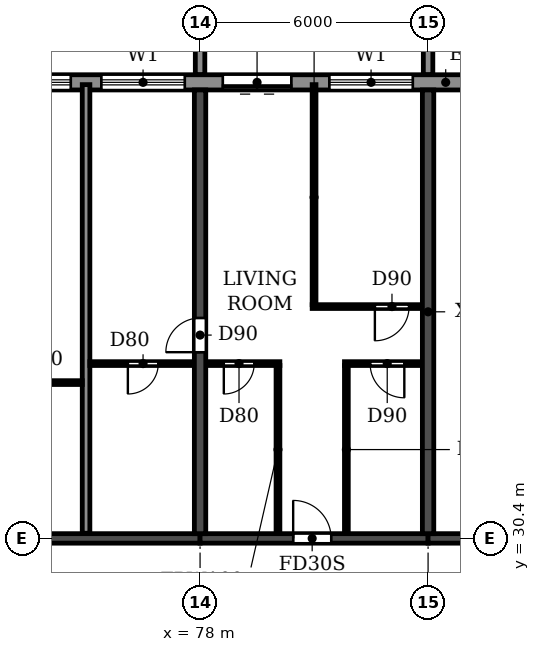
"""IFC4 building model, lengths in metres.
Left out: names, types, materials, properties, quantities, classifications, styles, units other than length and angle.
Written with IfcOpenShell. Run it as: python <this file> out.ifc"""

import sys

from ifc_helpers import new_model, si_unit, direction, frame, frame_2d, origin, place, context, subcontext, project, spatial, polyline, rectangle, outline, extrude, source, transform, mapped, element, fill, save


model = new_model("IFC4")
c1 = context("Model", 3, precision=1e-05, world=origin(), true_north=direction((0.0, 1.0)))
c2 = subcontext(c1, "Body", "Model", "MODEL_VIEW")
j1 = project(units=[si_unit("LENGTHUNIT", "METRE"), si_unit("PLANEANGLEUNIT", "RADIAN")], contexts=[c1])
p1 = place(None, origin())
s1 = spatial("IfcSite", under=j1, at=p1, CompositionType="ELEMENT")
p2 = place(p1, origin())
s2 = spatial("IfcBuilding", under=s1, at=p2, CompositionType="ELEMENT")
p3 = place(p2, frame((0.0, 0.0, 125.7)))
s3 = spatial("IfcBuildingStorey", under=s2, at=p3, CompositionType="ELEMENT", Elevation=125.7)
p4 = place(p3, frame((78.0, 30.525, 0.0), z_axis=(0.0, 0.0, 1.0), x_axis=(0.0, 1.0, 0.0)))
e1 = element("IfcWall", 1, at=p4, inside=s3, PredefinedType="SHEAR", context=c2, shape_type="SweptSolid", body=[
    extrude(rectangle(XDim=11.675, YDim=0.3, at=frame_2d((5.837, 0.0))), origin(), (0.0, 0.0, 1.0), 3.07),
])
p5 = place(p4, frame((4.775, 0.0, 0.0)))
e2 = element("IfcOpeningElement", 2, at=p5, cuts=e1, PredefinedType="OPENING", context=c2, shape_type="SweptSolid", body=[
    extrude(rectangle(XDim=0.9, YDim=2.1, at=frame_2d((0.45, 1.05))), frame((0.0, 0.16, 0.0), z_axis=(0.0, -1.0, 0.0), x_axis=(1.0, 0.0, 0.0)), (0.0, 0.0, 1.0), 0.32),
])
p6 = place(p3, frame((84.0, 30.525, 0.0), z_axis=(0.0, 0.0, 1.0), x_axis=(0.0, 1.0, 0.0)))
e3 = element("IfcWall", 3, at=p6, inside=s3, PredefinedType="SHEAR", context=c2, shape_type="SweptSolid", body=[
    extrude(rectangle(XDim=11.675, YDim=0.3, at=frame_2d((5.837, 0.0))), origin(), (0.0, 0.0, 1.0), 3.07),
])
p7 = place(p3, frame((72.0, 30.4, 0.0), z_axis=(0.0, 0.0, 1.0), x_axis=(1.0, 0.0, 0.0)))
e4 = element("IfcWall", 4, at=p7, inside=s3, PredefinedType="SHEAR", context=c2, shape_type="SweptSolid", body=[
    extrude(rectangle(XDim=6.0, YDim=0.25, at=frame_2d((3.0, 0.0))), origin(), (0.0, 0.0, 1.0), 2.47),
])
p8 = place(p3, frame((78.0, 30.4, 0.0), z_axis=(0.0, 0.0, 1.0), x_axis=(1.0, 0.0, 0.0)))
e5 = element("IfcWall", 5, at=p8, inside=s3, PredefinedType="SHEAR", context=c2, shape_type="SweptSolid", body=[
    extrude(rectangle(XDim=6.0, YDim=0.25, at=frame_2d((3.0, 0.0))), origin(), (0.0, 0.0, 1.0), 2.47),
])
p9 = place(p8, frame((2.45, 0.0, 0.0)))
e6 = element("IfcOpeningElement", 6, at=p9, cuts=e5, PredefinedType="OPENING", context=c2, shape_type="SweptSolid", body=[
    extrude(rectangle(XDim=1.0, YDim=2.1, at=frame_2d((0.5, 1.05))), frame((0.0, 0.135, 0.0), z_axis=(0.0, -1.0, 0.0), x_axis=(1.0, 0.0, 0.0)), (0.0, 0.0, 1.0), 0.27),
])
p10 = place(p3, frame((84.0, 30.4, 0.0), z_axis=(0.0, 0.0, 1.0), x_axis=(1.0, 0.0, 0.0)))
e7 = element("IfcWall", 7, at=p10, inside=s3, PredefinedType="SHEAR", context=c2, shape_type="SweptSolid", body=[
    extrude(rectangle(XDim=5.8, YDim=0.25, at=frame_2d((2.9, 0.0))), origin(), (0.0, 0.0, 1.0), 2.47),
])
p11 = place(p10, frame((2.5, 0.0, 0.0)))
e8 = element("IfcOpeningElement", 8, at=p11, cuts=e7, PredefinedType="OPENING", context=c2, shape_type="SweptSolid", body=[
    extrude(rectangle(XDim=1.0, YDim=2.1, at=frame_2d((0.5, 1.05))), frame((0.0, 0.135, 0.0), z_axis=(0.0, -1.0, 0.0), x_axis=(1.0, 0.0, 0.0)), (0.0, 0.0, 1.0), 0.27),
])
p12 = place(p3, frame((85.317, 42.4, 0.0), z_axis=(0.0, 0.0, 1.0), x_axis=(-1.0, 0.0, 0.0)))
e9 = element("IfcWall", 9, at=p12, inside=s3, PredefinedType="STANDARD", context=c2, shape_type="SweptSolid", body=[
    extrude(rectangle(XDim=68.634, YDim=0.4, at=frame_2d((34.317, 0.0))), origin(), (0.0, 0.0, 1.0), 3.07),
])
p13 = place(p12, frame((64.717, 0.0, 0.9)))
e10 = element("IfcOpeningElement", 10, at=p13, cuts=e9, PredefinedType="OPENING", context=c2, shape_type="SweptSolid", body=[
    extrude(rectangle(XDim=2.2, YDim=1.5, at=frame_2d((1.1, 0.75))), frame((0.0, 0.21, 0.0), z_axis=(0.0, -1.0, 0.0), x_axis=(1.0, 0.0, 0.0)), (0.0, 0.0, 1.0), 0.42),
])
p14 = place(p12, frame((61.917, 0.0, 0.0)))
e11 = element("IfcOpeningElement", 11, at=p14, cuts=e9, PredefinedType="OPENING", context=c2, shape_type="SweptSolid", body=[
    extrude(rectangle(XDim=1.8, YDim=2.4, at=frame_2d((0.9, 1.2))), frame((0.0, 0.21, 0.0), z_axis=(0.0, -1.0, 0.0), x_axis=(1.0, 0.0, 0.0)), (0.0, 0.0, 1.0), 0.42),
])
p15 = place(p12, frame((58.717, 0.0, 0.9)))
e12 = element("IfcOpeningElement", 12, at=p15, cuts=e9, PredefinedType="OPENING", context=c2, shape_type="SweptSolid", body=[
    extrude(rectangle(XDim=2.2, YDim=1.5, at=frame_2d((1.1, 0.75))), frame((0.0, 0.21, 0.0), z_axis=(0.0, -1.0, 0.0), x_axis=(1.0, 0.0, 0.0)), (0.0, 0.0, 1.0), 0.42),
])
p16 = place(p12, frame((55.917, 0.0, 0.0)))
e13 = element("IfcOpeningElement", 13, at=p16, cuts=e9, PredefinedType="OPENING", context=c2, shape_type="SweptSolid", body=[
    extrude(rectangle(XDim=1.8, YDim=2.4, at=frame_2d((0.9, 1.2))), frame((0.0, 0.21, 0.0), z_axis=(0.0, -1.0, 0.0), x_axis=(1.0, 0.0, 0.0)), (0.0, 0.0, 1.0), 0.42),
])
p17 = place(p12, frame((52.717, 0.0, 0.9)))
e14 = element("IfcOpeningElement", 14, at=p17, cuts=e9, PredefinedType="OPENING", context=c2, shape_type="SweptSolid", body=[
    extrude(rectangle(XDim=2.2, YDim=1.5, at=frame_2d((1.1, 0.75))), frame((0.0, 0.21, 0.0), z_axis=(0.0, -1.0, 0.0), x_axis=(1.0, 0.0, 0.0)), (0.0, 0.0, 1.0), 0.42),
])
p18 = place(p12, frame((49.917, 0.0, 0.0)))
e15 = element("IfcOpeningElement", 15, at=p18, cuts=e9, PredefinedType="OPENING", context=c2, shape_type="SweptSolid", body=[
    extrude(rectangle(XDim=1.8, YDim=2.4, at=frame_2d((0.9, 1.2))), frame((0.0, 0.21, 0.0), z_axis=(0.0, -1.0, 0.0), x_axis=(1.0, 0.0, 0.0)), (0.0, 0.0, 1.0), 0.42),
])
p19 = place(p12, frame((46.717, 0.0, 0.9)))
e16 = element("IfcOpeningElement", 16, at=p19, cuts=e9, PredefinedType="OPENING", context=c2, shape_type="SweptSolid", body=[
    extrude(rectangle(XDim=2.2, YDim=1.5, at=frame_2d((1.1, 0.75))), frame((0.0, 0.21, 0.0), z_axis=(0.0, -1.0, 0.0), x_axis=(1.0, 0.0, 0.0)), (0.0, 0.0, 1.0), 0.42),
])
p20 = place(p12, frame((43.917, 0.0, 0.0)))
e17 = element("IfcOpeningElement", 17, at=p20, cuts=e9, PredefinedType="OPENING", context=c2, shape_type="SweptSolid", body=[
    extrude(rectangle(XDim=1.8, YDim=2.4, at=frame_2d((0.9, 1.2))), frame((0.0, 0.21, 0.0), z_axis=(0.0, -1.0, 0.0), x_axis=(1.0, 0.0, 0.0)), (0.0, 0.0, 1.0), 0.42),
])
p21 = place(p12, frame((40.717, 0.0, 0.9)))
e18 = element("IfcOpeningElement", 18, at=p21, cuts=e9, PredefinedType="OPENING", context=c2, shape_type="SweptSolid", body=[
    extrude(rectangle(XDim=2.2, YDim=1.5, at=frame_2d((1.1, 0.75))), frame((0.0, 0.21, 0.0), z_axis=(0.0, -1.0, 0.0), x_axis=(1.0, 0.0, 0.0)), (0.0, 0.0, 1.0), 0.42),
])
p22 = place(p12, frame((37.717, 0.0, 0.9)))
e19 = element("IfcOpeningElement", 19, at=p22, cuts=e9, PredefinedType="OPENING", context=c2, shape_type="SweptSolid", body=[
    extrude(rectangle(XDim=2.2, YDim=1.5, at=frame_2d((1.1, 0.75))), frame((0.0, 0.21, 0.0), z_axis=(0.0, -1.0, 0.0), x_axis=(1.0, 0.0, 0.0)), (0.0, 0.0, 1.0), 0.42),
])
p23 = place(p12, frame((34.917, 0.0, 0.0)))
e20 = element("IfcOpeningElement", 20, at=p23, cuts=e9, PredefinedType="OPENING", context=c2, shape_type="SweptSolid", body=[
    extrude(rectangle(XDim=1.8, YDim=2.4, at=frame_2d((0.9, 1.2))), frame((0.0, 0.21, 0.0), z_axis=(0.0, -1.0, 0.0), x_axis=(1.0, 0.0, 0.0)), (0.0, 0.0, 1.0), 0.42),
])
p24 = place(p12, frame((31.717, 0.0, 0.9)))
e21 = element("IfcOpeningElement", 21, at=p24, cuts=e9, PredefinedType="OPENING", context=c2, shape_type="SweptSolid", body=[
    extrude(rectangle(XDim=2.2, YDim=1.5, at=frame_2d((1.1, 0.75))), frame((0.0, 0.21, 0.0), z_axis=(0.0, -1.0, 0.0), x_axis=(1.0, 0.0, 0.0)), (0.0, 0.0, 1.0), 0.42),
])
p25 = place(p12, frame((28.717, 0.0, 0.9)))
e22 = element("IfcOpeningElement", 22, at=p25, cuts=e9, PredefinedType="OPENING", context=c2, shape_type="SweptSolid", body=[
    extrude(rectangle(XDim=2.2, YDim=1.5, at=frame_2d((1.1, 0.75))), frame((0.0, 0.21, 0.0), z_axis=(0.0, -1.0, 0.0), x_axis=(1.0, 0.0, 0.0)), (0.0, 0.0, 1.0), 0.42),
])
p26 = place(p12, frame((25.717, 0.0, 0.9)))
e23 = element("IfcOpeningElement", 23, at=p26, cuts=e9, PredefinedType="OPENING", context=c2, shape_type="SweptSolid", body=[
    extrude(rectangle(XDim=2.2, YDim=1.5, at=frame_2d((1.1, 0.75))), frame((0.0, 0.21, 0.0), z_axis=(0.0, -1.0, 0.0), x_axis=(1.0, 0.0, 0.0)), (0.0, 0.0, 1.0), 0.42),
])
p27 = place(p12, frame((22.717, 0.0, 0.9)))
e24 = element("IfcOpeningElement", 24, at=p27, cuts=e9, PredefinedType="OPENING", context=c2, shape_type="SweptSolid", body=[
    extrude(rectangle(XDim=2.2, YDim=1.5, at=frame_2d((1.1, 0.75))), frame((0.0, 0.21, 0.0), z_axis=(0.0, -1.0, 0.0), x_axis=(1.0, 0.0, 0.0)), (0.0, 0.0, 1.0), 0.42),
])
p28 = place(p12, frame((19.917, 0.0, 0.0)))
e25 = element("IfcOpeningElement", 25, at=p28, cuts=e9, PredefinedType="OPENING", context=c2, shape_type="SweptSolid", body=[
    extrude(rectangle(XDim=1.8, YDim=2.4, at=frame_2d((0.9, 1.2))), frame((0.0, 0.21, 0.0), z_axis=(0.0, -1.0, 0.0), x_axis=(1.0, 0.0, 0.0)), (0.0, 0.0, 1.0), 0.42),
])
p29 = place(p12, frame((16.917, 0.0, 0.0)))
e26 = element("IfcOpeningElement", 26, at=p29, cuts=e9, PredefinedType="OPENING", context=c2, shape_type="SweptSolid", body=[
    extrude(rectangle(XDim=1.8, YDim=2.4, at=frame_2d((0.9, 1.2))), frame((0.0, 0.21, 0.0), z_axis=(0.0, -1.0, 0.0), x_axis=(1.0, 0.0, 0.0)), (0.0, 0.0, 1.0), 0.42),
])
p30 = place(p12, frame((13.717, 0.0, 0.9)))
e27 = element("IfcOpeningElement", 27, at=p30, cuts=e9, PredefinedType="OPENING", context=c2, shape_type="SweptSolid", body=[
    extrude(rectangle(XDim=2.2, YDim=1.5, at=frame_2d((1.1, 0.75))), frame((0.0, 0.21, 0.0), z_axis=(0.0, -1.0, 0.0), x_axis=(1.0, 0.0, 0.0)), (0.0, 0.0, 1.0), 0.42),
])
p31 = place(p12, frame((10.717, 0.0, 0.9)))
e28 = element("IfcOpeningElement", 28, at=p31, cuts=e9, PredefinedType="OPENING", context=c2, shape_type="SweptSolid", body=[
    extrude(rectangle(XDim=2.2, YDim=1.5, at=frame_2d((1.1, 0.75))), frame((0.0, 0.21, 0.0), z_axis=(0.0, -1.0, 0.0), x_axis=(1.0, 0.0, 0.0)), (0.0, 0.0, 1.0), 0.42),
])
p32 = place(p12, frame((7.717, 0.0, 0.9)))
e29 = element("IfcOpeningElement", 29, at=p32, cuts=e9, PredefinedType="OPENING", context=c2, shape_type="SweptSolid", body=[
    extrude(rectangle(XDim=2.2, YDim=1.5, at=frame_2d((1.1, 0.75))), frame((0.0, 0.21, 0.0), z_axis=(0.0, -1.0, 0.0), x_axis=(1.0, 0.0, 0.0)), (0.0, 0.0, 1.0), 0.42),
])
p33 = place(p12, frame((4.917, 0.0, 0.0)))
e30 = element("IfcOpeningElement", 30, at=p33, cuts=e9, PredefinedType="OPENING", context=c2, shape_type="SweptSolid", body=[
    extrude(rectangle(XDim=1.8, YDim=2.4, at=frame_2d((0.9, 1.2))), frame((0.0, 0.21, 0.0), z_axis=(0.0, -1.0, 0.0), x_axis=(1.0, 0.0, 0.0)), (0.0, 0.0, 1.0), 0.42),
])
p34 = place(p12, frame((1.717, 0.0, 0.9)))
e31 = element("IfcOpeningElement", 31, at=p34, cuts=e9, PredefinedType="OPENING", context=c2, shape_type="SweptSolid", body=[
    extrude(rectangle(XDim=2.2, YDim=1.5, at=frame_2d((1.1, 0.75))), frame((0.0, 0.21, 0.0), z_axis=(0.0, -1.0, 0.0), x_axis=(1.0, 0.0, 0.0)), (0.0, 0.0, 1.0), 0.42),
])
m1 = source(origin(), c2, "Body", "SweptSolid", [
    extrude(outline(polyline([(0.0, 0.0), (0.25, 0.0), (0.25, 3.1), (0.0, 3.1), (0.0, 0.0)])), origin(), (0.0, 0.0, 1.0), 3.1),
])
for number, where in (
    (32, (77.875, 42.6, 0.0)),
    (33, (83.875, 42.6, 0.0)),
):
    element("IfcWall", number, at=place(p3, frame(where)), inside=s3, PredefinedType="STANDARD", context=c2, shape_type="MappedRepresentation", body=[
        mapped(m1, transform((0.0, 0.0, 0.0))),
    ])
p35 = place(p3, frame((75.0, 30.535, 0.0), z_axis=(0.0, 0.0, 1.0), x_axis=(0.0, 1.0, 0.0)))
e34 = element("IfcWall", 34, at=p35, inside=s3, PredefinedType="PARTITIONING", context=c2, shape_type="SweptSolid", body=[
    extrude(rectangle(XDim=11.805, YDim=0.2, at=frame_2d((5.903, 0.0))), origin(), (0.0, 0.0, 1.0), 3.07),
])
p36 = place(p3, frame((72.16, 34.5, 0.0), z_axis=(0.0, 0.0, 1.0), x_axis=(1.0, 0.0, 0.0)))
e35 = element("IfcWall", 35, at=p36, inside=s3, PredefinedType="PARTITIONING", context=c2, shape_type="SweptSolid", body=[
    extrude(rectangle(XDim=2.74, YDim=0.1, at=frame_2d((1.37, 0.0))), origin(), (0.0, 0.0, 1.0), 3.07),
])
p37 = place(p36, frame((0.94, 0.0, 0.0)))
e36 = element("IfcOpeningElement", 36, at=p37, cuts=e35, PredefinedType="OPENING", context=c2, shape_type="SweptSolid", body=[
    extrude(rectangle(XDim=0.8, YDim=2.1, at=frame_2d((0.4, 1.05))), frame((0.0, 0.06, 0.0), z_axis=(0.0, -1.0, 0.0), x_axis=(1.0, 0.0, 0.0)), (0.0, 0.0, 1.0), 0.12),
])
p38 = place(p3, frame((75.1, 35.0, 0.0), z_axis=(0.0, 0.0, 1.0), x_axis=(1.0, 0.0, 0.0)))
e37 = element("IfcWall", 37, at=p38, inside=s3, PredefinedType="PARTITIONING", context=c2, shape_type="SweptSolid", body=[
    extrude(rectangle(XDim=2.74, YDim=0.1, at=frame_2d((1.37, 0.0))), origin(), (0.0, 0.0, 1.0), 3.07),
])
p39 = place(p38, frame((1.0, 0.0, 0.0)))
e38 = element("IfcOpeningElement", 38, at=p39, cuts=e37, PredefinedType="OPENING", context=c2, shape_type="SweptSolid", body=[
    extrude(rectangle(XDim=0.8, YDim=2.1, at=frame_2d((0.4, 1.05))), frame((0.0, 0.06, 0.0), z_axis=(0.0, -1.0, 0.0), x_axis=(1.0, 0.0, 0.0)), (0.0, 0.0, 1.0), 0.12),
])
p40 = place(p3, frame((78.16, 35.0, 0.0), z_axis=(0.0, 0.0, 1.0), x_axis=(1.0, 0.0, 0.0)))
e39 = element("IfcWall", 39, at=p40, inside=s3, PredefinedType="PARTITIONING", context=c2, shape_type="SweptSolid", body=[
    extrude(rectangle(XDim=1.94, YDim=0.1, at=frame_2d((0.97, 0.0))), origin(), (0.0, 0.0, 1.0), 3.07),
])
p41 = place(p40, frame((0.465, 0.0, 0.0)))
e40 = element("IfcOpeningElement", 40, at=p41, cuts=e39, PredefinedType="OPENING", context=c2, shape_type="SweptSolid", body=[
    extrude(rectangle(XDim=0.8, YDim=2.1, at=frame_2d((0.4, 1.05))), frame((0.0, 0.06, 0.0), z_axis=(0.0, -1.0, 0.0), x_axis=(1.0, 0.0, 0.0)), (0.0, 0.0, 1.0), 0.12),
])
p42 = place(p3, frame((81.8, 35.0, 0.0), z_axis=(0.0, 0.0, 1.0), x_axis=(1.0, 0.0, 0.0)))
e41 = element("IfcWall", 41, at=p42, inside=s3, PredefinedType="PARTITIONING", context=c2, shape_type="SweptSolid", body=[
    extrude(rectangle(XDim=2.04, YDim=0.1, at=frame_2d((1.02, 0.0))), origin(), (0.0, 0.0, 1.0), 3.07),
])
p43 = place(p42, frame((0.675, 0.0, 0.0)))
e42 = element("IfcOpeningElement", 42, at=p43, cuts=e41, PredefinedType="OPENING", context=c2, shape_type="SweptSolid", body=[
    extrude(rectangle(XDim=0.9, YDim=2.1, at=frame_2d((0.45, 1.05))), frame((0.0, 0.06, 0.0), z_axis=(0.0, -1.0, 0.0), x_axis=(1.0, 0.0, 0.0)), (0.0, 0.0, 1.0), 0.12),
])
p44 = place(p3, frame((80.95, 36.5, 0.0), z_axis=(0.0, 0.0, 1.0), x_axis=(1.0, 0.0, 0.0)))
e43 = element("IfcWall", 43, at=p44, inside=s3, PredefinedType="PARTITIONING", context=c2, shape_type="SweptSolid", body=[
    extrude(rectangle(XDim=2.89, YDim=0.1, at=frame_2d((1.445, 0.0))), origin(), (0.0, 0.0, 1.0), 3.07),
])
p45 = place(p44, frame((1.65, 0.0, 0.0)))
e44 = element("IfcOpeningElement", 44, at=p45, cuts=e43, PredefinedType="OPENING", context=c2, shape_type="SweptSolid", body=[
    extrude(rectangle(XDim=0.9, YDim=2.1, at=frame_2d((0.45, 1.05))), frame((0.0, 0.06, 0.0), z_axis=(0.0, -1.0, 0.0), x_axis=(1.0, 0.0, 0.0)), (0.0, 0.0, 1.0), 0.12),
])
p46 = place(p3, frame((80.05, 30.535, 0.0), z_axis=(0.0, 0.0, 1.0), x_axis=(0.0, 1.0, 0.0)))
e45 = element("IfcWall", 45, at=p46, inside=s3, PredefinedType="PARTITIONING", context=c2, shape_type="SweptSolid", body=[
    extrude(rectangle(XDim=4.415, YDim=0.1, at=frame_2d((2.208, 0.0))), origin(), (0.0, 0.0, 1.0), 3.07),
])
p47 = place(p3, frame((81.0, 36.55, 0.0), z_axis=(0.0, 0.0, 1.0), x_axis=(0.0, 1.0, 0.0)))
e46 = element("IfcWall", 46, at=p47, inside=s3, PredefinedType="PARTITIONING", context=c2, shape_type="SweptSolid", body=[
    extrude(rectangle(XDim=5.79, YDim=0.1, at=frame_2d((2.895, 0.0))), origin(), (0.0, 0.0, 1.0), 3.07),
])
p48 = place(p3, frame((81.85, 30.535, 0.0), z_axis=(0.0, 0.0, 1.0), x_axis=(0.0, 1.0, 0.0)))
e47 = element("IfcWall", 47, at=p48, inside=s3, PredefinedType="PARTITIONING", context=c2, shape_type="SweptSolid", body=[
    extrude(rectangle(XDim=4.415, YDim=0.1, at=frame_2d((2.208, 0.0))), origin(), (0.0, 0.0, 1.0), 3.07),
])
p49 = place(p31, origin())
e48 = element("IfcWindow", 48, at=p49, inside=s3, PartitioningType="DOUBLE_PANEL_HORIZONTAL", PredefinedType="WINDOW", context=c2, shape_type="SweptSolid", body=[
    extrude(rectangle(XDim=2.2, YDim=1.5, at=frame_2d((1.1, 0.75))), frame((0.0, 0.03, 0.0), z_axis=(0.0, -1.0, 0.0), x_axis=(1.0, 0.0, 0.0)), (0.0, 0.0, 1.0), 0.06),
])
fill(e28, e48)
p50 = place(p32, origin())
e49 = element("IfcWindow", 49, at=p50, inside=s3, PartitioningType="DOUBLE_PANEL_HORIZONTAL", PredefinedType="WINDOW", context=c2, shape_type="SweptSolid", body=[
    extrude(rectangle(XDim=2.2, YDim=1.5, at=frame_2d((1.1, 0.75))), frame((0.0, 0.03, 0.0), z_axis=(0.0, -1.0, 0.0), x_axis=(1.0, 0.0, 0.0)), (0.0, 0.0, 1.0), 0.06),
])
fill(e29, e49)
p51 = place(p33, origin())
e50 = element("IfcDoor", 50, at=p51, inside=s3, OperationType="DOUBLE_DOOR_SLIDING", PredefinedType="DOOR", context=c2, shape_type="SweptSolid", body=[
    extrude(rectangle(XDim=1.8, YDim=2.4, at=frame_2d((0.9, 1.2))), frame((0.0, 0.025, 0.0), z_axis=(0.0, -1.0, 0.0), x_axis=(1.0, 0.0, 0.0)), (0.0, 0.0, 1.0), 0.05),
])
fill(e30, e50)
p52 = place(p34, origin())
e51 = element("IfcWindow", 51, at=p52, inside=s3, PartitioningType="DOUBLE_PANEL_HORIZONTAL", PredefinedType="WINDOW", context=c2, shape_type="SweptSolid", body=[
    extrude(rectangle(XDim=2.2, YDim=1.5, at=frame_2d((1.1, 0.75))), frame((0.0, 0.03, 0.0), z_axis=(0.0, -1.0, 0.0), x_axis=(1.0, 0.0, 0.0)), (0.0, 0.0, 1.0), 0.06),
])
fill(e31, e51)
p53 = place(p39, frame((0.8, 0.0, 0.0), z_axis=(0.0, 0.0, 1.0), x_axis=(-1.0, 0.0, 0.0)))
e52 = element("IfcDoor", 52, at=p53, inside=s3, OperationType="SINGLE_SWING_RIGHT", PredefinedType="DOOR", context=c2, shape_type="SweptSolid", body=[
    extrude(rectangle(XDim=0.8, YDim=2.1, at=frame_2d((0.4, 1.05))), frame((0.0, 0.025, 0.0), z_axis=(0.0, -1.0, 0.0), x_axis=(1.0, 0.0, 0.0)), (0.0, 0.0, 1.0), 0.05),
])
fill(e38, e52)
p54 = place(p5, origin())
e53 = element("IfcDoor", 53, at=p54, inside=s3, OperationType="SINGLE_SWING_LEFT", PredefinedType="DOOR", context=c2, shape_type="SweptSolid", body=[
    extrude(rectangle(XDim=0.9, YDim=2.1, at=frame_2d((0.45, 1.05))), frame((0.0, 0.025, 0.0), z_axis=(0.0, -1.0, 0.0), x_axis=(1.0, 0.0, 0.0)), (0.0, 0.0, 1.0), 0.05),
])
fill(e2, e53)
p55 = place(p41, frame((0.8, 0.0, 0.0), z_axis=(0.0, 0.0, 1.0), x_axis=(-1.0, 0.0, 0.0)))
e54 = element("IfcDoor", 54, at=p55, inside=s3, OperationType="SINGLE_SWING_RIGHT", PredefinedType="DOOR", context=c2, shape_type="SweptSolid", body=[
    extrude(rectangle(XDim=0.8, YDim=2.1, at=frame_2d((0.4, 1.05))), frame((0.0, 0.025, 0.0), z_axis=(0.0, -1.0, 0.0), x_axis=(1.0, 0.0, 0.0)), (0.0, 0.0, 1.0), 0.05),
])
fill(e40, e54)
p56 = place(p9, origin())
e55 = element("IfcDoor", 55, at=p56, inside=s3, OperationType="SINGLE_SWING_LEFT", PredefinedType="DOOR", context=c2, shape_type="SweptSolid", body=[
    extrude(rectangle(XDim=1.0, YDim=2.1, at=frame_2d((0.5, 1.05))), frame((0.0, 0.025, 0.0), z_axis=(0.0, -1.0, 0.0), x_axis=(1.0, 0.0, 0.0)), (0.0, 0.0, 1.0), 0.05),
])
fill(e6, e55)
p57 = place(p43, frame((0.9, 0.0, 0.0), z_axis=(0.0, 0.0, 1.0), x_axis=(-1.0, 0.0, 0.0)))
e56 = element("IfcDoor", 56, at=p57, inside=s3, OperationType="SINGLE_SWING_LEFT", PredefinedType="DOOR", context=c2, shape_type="SweptSolid", body=[
    extrude(rectangle(XDim=0.9, YDim=2.1, at=frame_2d((0.45, 1.05))), frame((0.0, 0.025, 0.0), z_axis=(0.0, -1.0, 0.0), x_axis=(1.0, 0.0, 0.0)), (0.0, 0.0, 1.0), 0.05),
])
fill(e42, e56)
p58 = place(p45, frame((0.9, 0.0, 0.0), z_axis=(0.0, 0.0, 1.0), x_axis=(-1.0, 0.0, 0.0)))
e57 = element("IfcDoor", 57, at=p58, inside=s3, OperationType="SINGLE_SWING_RIGHT", PredefinedType="DOOR", context=c2, shape_type="SweptSolid", body=[
    extrude(rectangle(XDim=0.9, YDim=2.1, at=frame_2d((0.45, 1.05))), frame((0.0, 0.025, 0.0), z_axis=(0.0, -1.0, 0.0), x_axis=(1.0, 0.0, 0.0)), (0.0, 0.0, 1.0), 0.05),
])
fill(e44, e57)
save(model, sys.argv[1])
